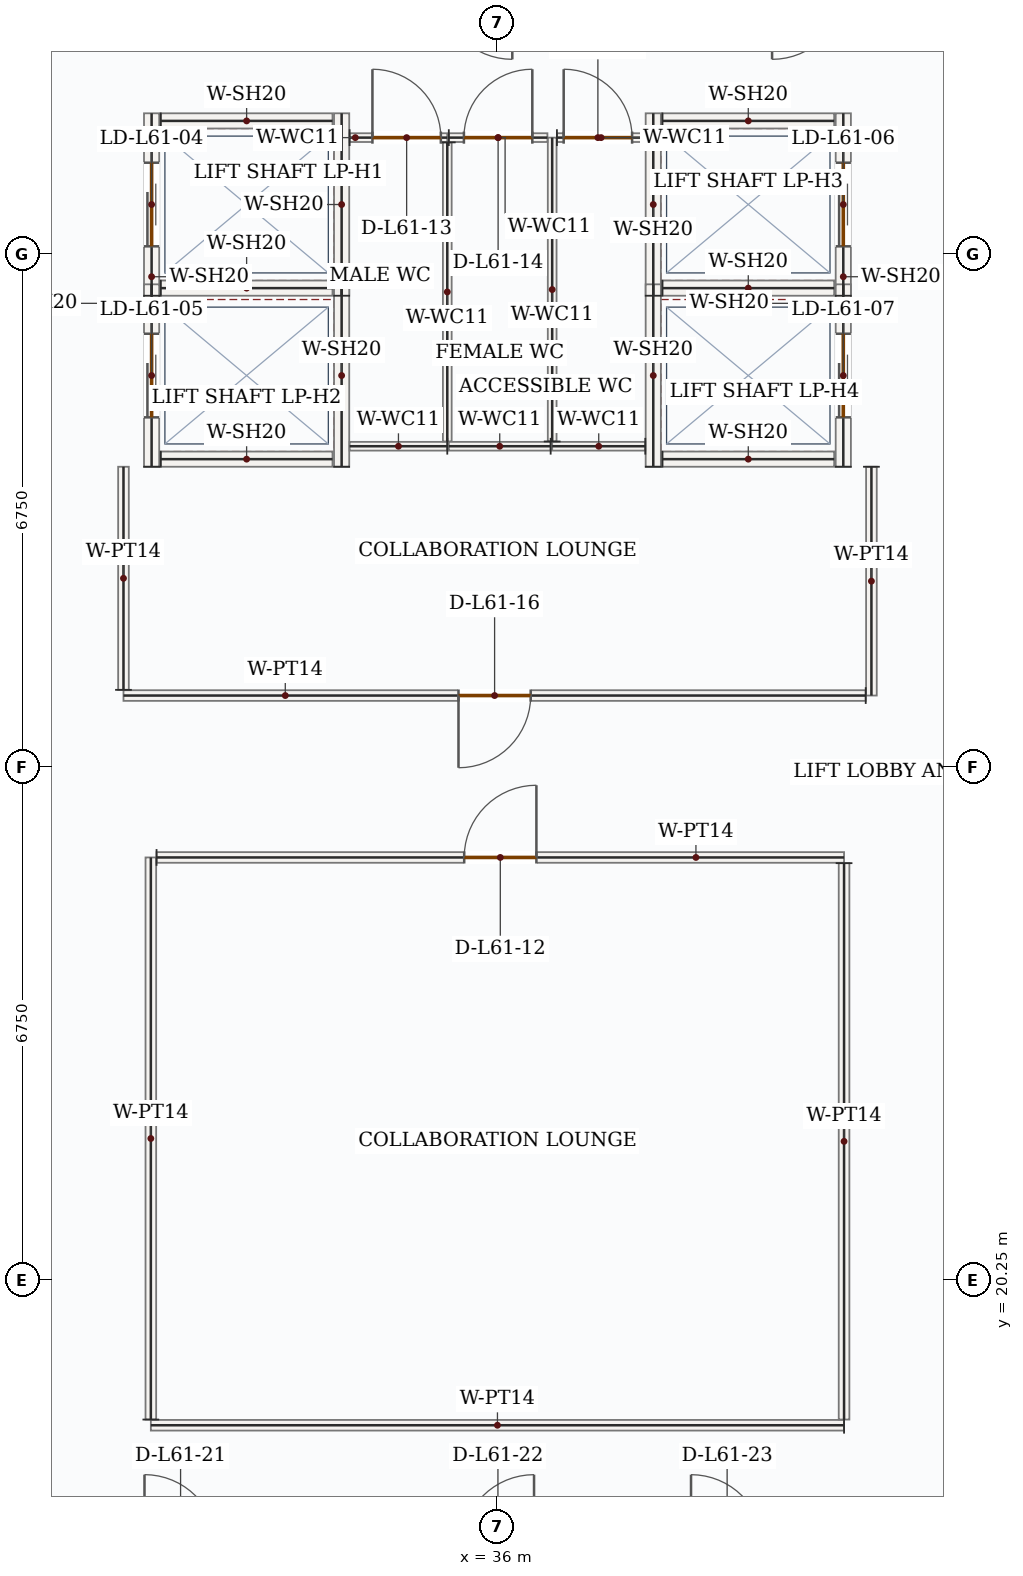
"""IFC4 building model, lengths in metres.
Left out: names, types, materials, properties, quantities, classifications, styles, units other than length and angle.
Written with IfcOpenShell. Run it as: python <this file> out.ifc"""

import sys

from ifc_helpers import new_model, si_unit, direction, frame, frame_2d, origin, place, context, subcontext, project, spatial, rectangle, extrude, source, transform, mapped, element, fill, save


model = new_model("IFC4")
c1 = context("Model", 3, precision=1e-05, world=origin(), true_north=direction((0.0, 1.0)))
c2 = subcontext(c1, "Body", "Model", "MODEL_VIEW")
j1 = project(units=[si_unit("LENGTHUNIT", "METRE"), si_unit("PLANEANGLEUNIT", "RADIAN")], contexts=[c1])
p1 = place(None, origin())
s1 = spatial("IfcSite", under=j1, at=p1, CompositionType="ELEMENT")
p2 = place(p1, origin())
s2 = spatial("IfcBuilding", under=s1, at=p2, CompositionType="ELEMENT")
p3 = place(p2, frame((0.0, 0.0, 257.85)))
s3 = spatial("IfcBuildingStorey", under=s2, at=p3, CompositionType="ELEMENT", Elevation=257.85)
p4 = place(p3, frame((31.45, 33.2, 0.0), z_axis=(0.0, 0.0, 1.0), x_axis=(0.0, 1.0, 0.0)))
e1 = element("IfcWall", 1, at=p4, inside=s3, PredefinedType="SOLIDWALL", context=c2, shape_type="SweptSolid", body=[
    extrude(rectangle(XDim=2.4, YDim=0.2, at=frame_2d((1.2, 0.0))), origin(), (0.0, 0.0, 1.0), 3.5),
])
p5 = place(p4, frame((0.65, 0.0, 0.0)))
e2 = element("IfcOpeningElement", 2, at=p5, cuts=e1, PredefinedType="OPENING", context=c2, shape_type="SweptSolid", body=[
    extrude(rectangle(XDim=1.1, YDim=2.15, at=frame_2d((0.55, 1.075))), frame((0.0, 0.11, 0.0), z_axis=(0.0, -1.0, 0.0), x_axis=(1.0, 0.0, 0.0)), (0.0, 0.0, 1.0), 0.22),
])
m1 = source(origin(), c2, "Body", "SweptSolid", [
    extrude(rectangle(XDim=2.4, YDim=0.2, at=frame_2d((1.2, 0.0))), origin(), (0.0, 0.0, 1.0), 3.5),
])
p6 = place(p3, frame((33.95, 33.2, 0.0), z_axis=(0.0, 0.0, 1.0), x_axis=(0.0, 1.0, 0.0)))
e3 = element("IfcWall", 3, at=p6, inside=s3, PredefinedType="SOLIDWALL", context=c2, shape_type="MappedRepresentation", body=[
    mapped(m1, transform((0.0, 0.0, 0.0), x_axis=(1.0, 0.0, 0.0), y_axis=(0.0, 1.0, 0.0), z_axis=(0.0, 0.0, 1.0), scale=1.0)),
])
m2 = source(origin(), c2, "Body", "SweptSolid", [
    extrude(rectangle(XDim=2.26, YDim=0.2, at=frame_2d((1.13, 0.0))), origin(), (0.0, 0.0, 1.0), 3.5),
])
for number, where, z_axis, x_axis in (
    (4, (31.57, 33.3, 0.0), (0.0, 0.0, 1.0), (1.0, 0.0, 0.0)),
    (5, (31.57, 35.5, 0.0), (0.0, 0.0, 1.0), (1.0, 0.0, 0.0)),
):
    element("IfcWall", number, at=place(p3, frame(where, z_axis=z_axis, x_axis=x_axis)), inside=s3, PredefinedType="SOLIDWALL", context=c2, shape_type="MappedRepresentation", body=[
        mapped(m2, transform((0.0, 0.0, 0.0), x_axis=(1.0, 0.0, 0.0), y_axis=(0.0, 1.0, 0.0), z_axis=(0.0, 0.0, 1.0), scale=1.0)),
    ])
p7 = place(p3, frame((31.45, 30.95, 0.0), z_axis=(0.0, 0.0, 1.0), x_axis=(0.0, 1.0, 0.0)))
e6 = element("IfcWall", 6, at=p7, inside=s3, PredefinedType="SOLIDWALL", context=c2, shape_type="SweptSolid", body=[
    extrude(rectangle(XDim=2.4, YDim=0.2, at=frame_2d((1.2, 0.0))), origin(), (0.0, 0.0, 1.0), 3.5),
])
p8 = place(p7, frame((0.65, 0.0, 0.0)))
e7 = element("IfcOpeningElement", 7, at=p8, cuts=e6, PredefinedType="OPENING", context=c2, shape_type="SweptSolid", body=[
    extrude(rectangle(XDim=1.1, YDim=2.15, at=frame_2d((0.55, 1.075))), frame((0.0, 0.11, 0.0), z_axis=(0.0, -1.0, 0.0), x_axis=(1.0, 0.0, 0.0)), (0.0, 0.0, 1.0), 0.22),
])
p9 = place(p3, frame((33.95, 30.95, 0.0), z_axis=(0.0, 0.0, 1.0), x_axis=(0.0, 1.0, 0.0)))
e8 = element("IfcWall", 8, at=p9, inside=s3, PredefinedType="SOLIDWALL", context=c2, shape_type="MappedRepresentation", body=[
    mapped(m1, transform((0.0, 0.0, 0.0), x_axis=(1.0, 0.0, 0.0), y_axis=(0.0, 1.0, 0.0), z_axis=(0.0, 0.0, 1.0), scale=1.0)),
])
p10 = place(p3, frame((31.57, 31.05, 0.0), z_axis=(0.0, 0.0, 1.0), x_axis=(1.0, 0.0, 0.0)))
e9 = element("IfcWall", 9, at=p10, inside=s3, PredefinedType="SOLIDWALL", context=c2, shape_type="MappedRepresentation", body=[
    mapped(m2, transform((0.0, 0.0, 0.0), x_axis=(1.0, 0.0, 0.0), y_axis=(0.0, 1.0, 0.0), z_axis=(0.0, 0.0, 1.0), scale=1.0)),
])
p11 = place(p3, frame((38.05, 33.2, 0.0), z_axis=(0.0, 0.0, 1.0), x_axis=(0.0, 1.0, 0.0)))
e10 = element("IfcWall", 10, at=p11, inside=s3, PredefinedType="SOLIDWALL", context=c2, shape_type="MappedRepresentation", body=[
    mapped(m1, transform((0.0, 0.0, 0.0), x_axis=(1.0, 0.0, 0.0), y_axis=(0.0, 1.0, 0.0), z_axis=(0.0, 0.0, 1.0), scale=1.0)),
])
p12 = place(p3, frame((40.55, 33.2, 0.0), z_axis=(0.0, 0.0, 1.0), x_axis=(0.0, 1.0, 0.0)))
e11 = element("IfcWall", 11, at=p12, inside=s3, PredefinedType="SOLIDWALL", context=c2, shape_type="SweptSolid", body=[
    extrude(rectangle(XDim=2.4, YDim=0.2, at=frame_2d((1.2, 0.0))), origin(), (0.0, 0.0, 1.0), 3.5),
])
p13 = place(p12, frame((0.65, 0.0, 0.0)))
e12 = element("IfcOpeningElement", 12, at=p13, cuts=e11, PredefinedType="OPENING", context=c2, shape_type="SweptSolid", body=[
    extrude(rectangle(XDim=1.1, YDim=2.15, at=frame_2d((0.55, 1.075))), frame((0.0, 0.11, 0.0), z_axis=(0.0, -1.0, 0.0), x_axis=(1.0, 0.0, 0.0)), (0.0, 0.0, 1.0), 0.22),
])
for number, where, z_axis, x_axis in (
    (13, (38.17, 33.3, 0.0), (0.0, 0.0, 1.0), (1.0, 0.0, 0.0)),
    (14, (38.17, 35.5, 0.0), (0.0, 0.0, 1.0), (1.0, 0.0, 0.0)),
):
    element("IfcWall", number, at=place(p3, frame(where, z_axis=z_axis, x_axis=x_axis)), inside=s3, PredefinedType="SOLIDWALL", context=c2, shape_type="MappedRepresentation", body=[
        mapped(m2, transform((0.0, 0.0, 0.0), x_axis=(1.0, 0.0, 0.0), y_axis=(0.0, 1.0, 0.0), z_axis=(0.0, 0.0, 1.0), scale=1.0)),
    ])
p14 = place(p3, frame((38.05, 30.95, 0.0), z_axis=(0.0, 0.0, 1.0), x_axis=(0.0, 1.0, 0.0)))
e15 = element("IfcWall", 15, at=p14, inside=s3, PredefinedType="SOLIDWALL", context=c2, shape_type="MappedRepresentation", body=[
    mapped(m1, transform((0.0, 0.0, 0.0), x_axis=(1.0, 0.0, 0.0), y_axis=(0.0, 1.0, 0.0), z_axis=(0.0, 0.0, 1.0), scale=1.0)),
])
p15 = place(p3, frame((40.55, 30.95, 0.0), z_axis=(0.0, 0.0, 1.0), x_axis=(0.0, 1.0, 0.0)))
e16 = element("IfcWall", 16, at=p15, inside=s3, PredefinedType="SOLIDWALL", context=c2, shape_type="SweptSolid", body=[
    extrude(rectangle(XDim=2.4, YDim=0.2, at=frame_2d((1.2, 0.0))), origin(), (0.0, 0.0, 1.0), 3.5),
])
p16 = place(p15, frame((0.65, 0.0, 0.0)))
e17 = element("IfcOpeningElement", 17, at=p16, cuts=e16, PredefinedType="OPENING", context=c2, shape_type="SweptSolid", body=[
    extrude(rectangle(XDim=1.1, YDim=2.15, at=frame_2d((0.55, 1.075))), frame((0.0, 0.11, 0.0), z_axis=(0.0, -1.0, 0.0), x_axis=(1.0, 0.0, 0.0)), (0.0, 0.0, 1.0), 0.22),
])
p17 = place(p3, frame((38.17, 31.05, 0.0), z_axis=(0.0, 0.0, 1.0), x_axis=(1.0, 0.0, 0.0)))
e18 = element("IfcWall", 18, at=p17, inside=s3, PredefinedType="SOLIDWALL", context=c2, shape_type="MappedRepresentation", body=[
    mapped(m2, transform((0.0, 0.0, 0.0), x_axis=(1.0, 0.0, 0.0), y_axis=(0.0, 1.0, 0.0), z_axis=(0.0, 0.0, 1.0), scale=1.0)),
])
m3 = source(origin(), c2, "Body", "SweptSolid", [
    extrude(rectangle(XDim=1.225, YDim=0.115, at=frame_2d((0.613, 0.0))), origin(), (0.0, 0.0, 1.0), 3.5),
])
p18 = place(p3, frame((37.945, 31.22, 0.0), z_axis=(0.0, 0.0, 1.0), x_axis=(-1.0, 0.0, 0.0)))
e19 = element("IfcWall", 19, at=p18, inside=s3, PredefinedType="PARTITIONING", context=c2, shape_type="MappedRepresentation", body=[
    mapped(m3, transform((0.0, 0.0, 0.0), x_axis=(1.0, 0.0, 0.0), y_axis=(0.0, 1.0, 0.0), z_axis=(0.0, 0.0, 1.0), scale=1.0)),
])
m4 = source(origin(), c2, "Body", "SweptSolid", [
    extrude(rectangle(XDim=3.998, YDim=0.115, at=frame_2d((1.999, 0.0))), origin(), (0.0, 0.0, 1.0), 3.5),
])
p19 = place(p3, frame((36.72, 31.282, 0.0), z_axis=(0.0, 0.0, 1.0), x_axis=(0.0, 1.0, 0.0)))
e20 = element("IfcWall", 20, at=p19, inside=s3, PredefinedType="PARTITIONING", context=c2, shape_type="MappedRepresentation", body=[
    mapped(m4, transform((0.0, 0.0, 0.0), x_axis=(1.0, 0.0, 0.0), y_axis=(0.0, 1.0, 0.0), z_axis=(0.0, 0.0, 1.0), scale=1.0)),
])
p20 = place(p3, frame((36.782, 35.28, 0.0), z_axis=(0.0, 0.0, 1.0), x_axis=(1.0, 0.0, 0.0)))
e21 = element("IfcWall", 21, at=p20, inside=s3, PredefinedType="PARTITIONING", context=c2, shape_type="SweptSolid", body=[
    extrude(rectangle(XDim=1.163, YDim=0.115, at=frame_2d((0.581, 0.0))), origin(), (0.0, 0.0, 1.0), 3.5),
])
p21 = place(p20, frame((0.089, 0.0, 0.0)))
e22 = element("IfcOpeningElement", 22, at=p21, cuts=e21, PredefinedType="OPENING", context=c2, shape_type="SweptSolid", body=[
    extrude(rectangle(XDim=0.9, YDim=2.1, at=frame_2d((0.45, 1.05))), frame((0.0, 0.067, 0.0), z_axis=(0.0, -1.0, 0.0), x_axis=(1.0, 0.0, 0.0)), (0.0, 0.0, 1.0), 0.135),
])
m5 = source(origin(), c2, "Body", "SweptSolid", [
    extrude(rectangle(XDim=1.285, YDim=0.115, at=frame_2d((0.643, 0.0))), origin(), (0.0, 0.0, 1.0), 3.5),
])
p22 = place(p3, frame((35.34, 31.22, 0.0), z_axis=(0.0, 0.0, 1.0), x_axis=(-1.0, 0.0, 0.0)))
e23 = element("IfcWall", 23, at=p22, inside=s3, PredefinedType="PARTITIONING", context=c2, shape_type="MappedRepresentation", body=[
    mapped(m5, transform((0.0, 0.0, 0.0), x_axis=(1.0, 0.0, 0.0), y_axis=(0.0, 1.0, 0.0), z_axis=(0.0, 0.0, 1.0), scale=1.0)),
])
p23 = place(p3, frame((34.055, 35.28, 0.0), z_axis=(0.0, 0.0, 1.0), x_axis=(1.0, 0.0, 0.0)))
e24 = element("IfcWall", 24, at=p23, inside=s3, PredefinedType="PARTITIONING", context=c2, shape_type="SweptSolid", body=[
    extrude(rectangle(XDim=1.285, YDim=0.115, at=frame_2d((0.643, 0.0))), origin(), (0.0, 0.0, 1.0), 3.5),
])
p24 = place(p23, frame((0.3, 0.0, 0.0)))
e25 = element("IfcOpeningElement", 25, at=p24, cuts=e24, PredefinedType="OPENING", context=c2, shape_type="SweptSolid", body=[
    extrude(rectangle(XDim=0.9, YDim=2.1, at=frame_2d((0.45, 1.05))), frame((0.0, 0.067, 0.0), z_axis=(0.0, -1.0, 0.0), x_axis=(1.0, 0.0, 0.0)), (0.0, 0.0, 1.0), 0.135),
])
m6 = source(origin(), c2, "Body", "SweptSolid", [
    extrude(rectangle(XDim=3.935, YDim=0.115, at=frame_2d((1.968, 0.0))), origin(), (0.0, 0.0, 1.0), 3.5),
])
p25 = place(p3, frame((35.34, 35.218, 0.0), z_axis=(0.0, 0.0, 1.0), x_axis=(0.0, -1.0, 0.0)))
e26 = element("IfcWall", 26, at=p25, inside=s3, PredefinedType="PARTITIONING", context=c2, shape_type="MappedRepresentation", body=[
    mapped(m6, transform((0.0, 0.0, 0.0), x_axis=(1.0, 0.0, 0.0), y_axis=(0.0, 1.0, 0.0), z_axis=(0.0, 0.0, 1.0), scale=1.0)),
])
m7 = source(origin(), c2, "Body", "SweptSolid", [
    extrude(rectangle(XDim=1.34, YDim=0.115, at=frame_2d((0.67, 0.0))), origin(), (0.0, 0.0, 1.0), 3.5),
])
p26 = place(p3, frame((36.7, 31.22, 0.0), z_axis=(0.0, 0.0, 1.0), x_axis=(-1.0, 0.0, 0.0)))
e27 = element("IfcWall", 27, at=p26, inside=s3, PredefinedType="PARTITIONING", context=c2, shape_type="MappedRepresentation", body=[
    mapped(m7, transform((0.0, 0.0, 0.0), x_axis=(1.0, 0.0, 0.0), y_axis=(0.0, 1.0, 0.0), z_axis=(0.0, 0.0, 1.0), scale=1.0)),
])
p27 = place(p3, frame((35.36, 35.28, 0.0), z_axis=(0.0, 0.0, 1.0), x_axis=(1.0, 0.0, 0.0)))
e28 = element("IfcWall", 28, at=p27, inside=s3, PredefinedType="PARTITIONING", context=c2, shape_type="SweptSolid", body=[
    extrude(rectangle(XDim=1.297, YDim=0.115, at=frame_2d((0.649, 0.0))), origin(), (0.0, 0.0, 1.0), 3.5),
])
p28 = place(p27, frame((0.199, 0.0, 0.0)))
e29 = element("IfcOpeningElement", 29, at=p28, cuts=e28, PredefinedType="OPENING", context=c2, shape_type="SweptSolid", body=[
    extrude(rectangle(XDim=0.9, YDim=2.1, at=frame_2d((0.45, 1.05))), frame((0.0, 0.067, 0.0), z_axis=(0.0, -1.0, 0.0), x_axis=(1.0, 0.0, 0.0)), (0.0, 0.0, 1.0), 0.135),
])
m8 = source(origin(), c2, "Body", "SweptSolid", [
    extrude(rectangle(XDim=3.01, YDim=0.14, at=frame_2d((1.505, 0.0))), origin(), (0.0, 0.0, 1.0), 3.5),
])
p29 = place(p3, frame((40.92, 30.95, 0.0), z_axis=(0.0, 0.0, 1.0), x_axis=(0.0, -1.0, 0.0)))
e30 = element("IfcWall", 30, at=p29, inside=s3, PredefinedType="PARTITIONING", context=c2, shape_type="MappedRepresentation", body=[
    mapped(m8, transform((0.0, 0.0, 0.0), x_axis=(1.0, 0.0, 0.0), y_axis=(0.0, 1.0, 0.0), z_axis=(0.0, 0.0, 1.0), scale=1.0)),
])
p30 = place(p3, frame((40.845, 27.94, 0.0), z_axis=(0.0, 0.0, 1.0), x_axis=(-1.0, 0.0, 0.0)))
e31 = element("IfcWall", 31, at=p30, inside=s3, PredefinedType="PARTITIONING", context=c2, shape_type="SweptSolid", body=[
    extrude(rectangle(XDim=9.765, YDim=0.14, at=frame_2d((4.882, 0.0))), origin(), (0.0, 0.0, 1.0), 3.5),
])
p31 = place(p30, frame((4.407, 0.0, 0.0)))
e32 = element("IfcOpeningElement", 32, at=p31, cuts=e31, PredefinedType="OPENING", context=c2, shape_type="SweptSolid", body=[
    extrude(rectangle(XDim=0.95, YDim=2.15, at=frame_2d((0.475, 1.075))), frame((0.0, 0.08, 0.0), z_axis=(0.0, -1.0, 0.0), x_axis=(1.0, 0.0, 0.0)), (0.0, 0.0, 1.0), 0.16),
])
m9 = source(origin(), c2, "Body", "SweptSolid", [
    extrude(rectangle(XDim=2.935, YDim=0.14, at=frame_2d((1.468, 0.0))), origin(), (0.0, 0.0, 1.0), 3.5),
])
p32 = place(p3, frame((31.08, 28.015, 0.0), z_axis=(0.0, 0.0, 1.0), x_axis=(0.0, 1.0, 0.0)))
e33 = element("IfcWall", 33, at=p32, inside=s3, PredefinedType="PARTITIONING", context=c2, shape_type="MappedRepresentation", body=[
    mapped(m9, transform((0.0, 0.0, 0.0), x_axis=(1.0, 0.0, 0.0), y_axis=(0.0, 1.0, 0.0), z_axis=(0.0, 0.0, 1.0), scale=1.0)),
])
m10 = source(origin(), c2, "Body", "SweptSolid", [
    extrude(rectangle(XDim=9.12, YDim=0.14, at=frame_2d((4.56, 0.0))), origin(), (0.0, 0.0, 1.0), 3.5),
])
p33 = place(p3, frame((40.56, 18.34, 0.0), z_axis=(0.0, 0.0, 1.0), x_axis=(-1.0, 0.0, 0.0)))
e34 = element("IfcWall", 34, at=p33, inside=s3, PredefinedType="PARTITIONING", context=c2, shape_type="MappedRepresentation", body=[
    mapped(m10, transform((0.0, 0.0, 0.0), x_axis=(1.0, 0.0, 0.0), y_axis=(0.0, 1.0, 0.0), z_axis=(0.0, 0.0, 1.0), scale=1.0)),
])
m11 = source(origin(), c2, "Body", "SweptSolid", [
    extrude(rectangle(XDim=7.395, YDim=0.14, at=frame_2d((3.698, 0.0))), origin(), (0.0, 0.0, 1.0), 3.5),
])
p34 = place(p3, frame((31.44, 18.415, 0.0), z_axis=(0.0, 0.0, 1.0), x_axis=(0.0, 1.0, 0.0)))
e35 = element("IfcWall", 35, at=p34, inside=s3, PredefinedType="PARTITIONING", context=c2, shape_type="MappedRepresentation", body=[
    mapped(m11, transform((0.0, 0.0, 0.0), x_axis=(1.0, 0.0, 0.0), y_axis=(0.0, 1.0, 0.0), z_axis=(0.0, 0.0, 1.0), scale=1.0)),
])
p35 = place(p3, frame((31.515, 25.81, 0.0), z_axis=(0.0, 0.0, 1.0), x_axis=(1.0, 0.0, 0.0)))
e36 = element("IfcWall", 36, at=p35, inside=s3, PredefinedType="PARTITIONING", context=c2, shape_type="SweptSolid", body=[
    extrude(rectangle(XDim=9.045, YDim=0.14, at=frame_2d((4.522, 0.0))), origin(), (0.0, 0.0, 1.0), 3.5),
])
p36 = place(p35, frame((4.048, 0.0, 0.0)))
e37 = element("IfcOpeningElement", 37, at=p36, cuts=e36, PredefinedType="OPENING", context=c2, shape_type="SweptSolid", body=[
    extrude(rectangle(XDim=0.95, YDim=2.15, at=frame_2d((0.475, 1.075))), frame((0.0, 0.08, 0.0), z_axis=(0.0, -1.0, 0.0), x_axis=(1.0, 0.0, 0.0)), (0.0, 0.0, 1.0), 0.16),
])
m12 = source(origin(), c2, "Body", "SweptSolid", [
    extrude(rectangle(XDim=7.32, YDim=0.14, at=frame_2d((3.66, 0.0))), origin(), (0.0, 0.0, 1.0), 3.5),
])
p37 = place(p3, frame((40.56, 25.735, 0.0), z_axis=(0.0, 0.0, 1.0), x_axis=(0.0, -1.0, 0.0)))
e38 = element("IfcWall", 38, at=p37, inside=s3, PredefinedType="PARTITIONING", context=c2, shape_type="MappedRepresentation", body=[
    mapped(m12, transform((0.0, 0.0, 0.0), x_axis=(1.0, 0.0, 0.0), y_axis=(0.0, 1.0, 0.0), z_axis=(0.0, 0.0, 1.0), scale=1.0)),
])
m13 = source(origin(), c2, "Body", "SweptSolid", [
    extrude(rectangle(XDim=1.1, YDim=2.15, at=frame_2d((0.55, 1.075))), frame((0.0, 0.025, 0.0), z_axis=(0.0, -1.0, 0.0), x_axis=(1.0, 0.0, 0.0)), (0.0, 0.0, 1.0), 0.05),
])
p38 = place(p5, origin())
e39 = element("IfcDoor", 39, at=p38, inside=s3, OperationType="DOUBLE_DOOR_SLIDING", PredefinedType="DOOR", context=c2, shape_type="MappedRepresentation", body=[
    mapped(m13, transform((0.0, 0.0, 0.0), x_axis=(1.0, 0.0, 0.0), y_axis=(0.0, 1.0, 0.0), z_axis=(0.0, 0.0, 1.0), scale=1.0)),
])
fill(e2, e39)
p39 = place(p8, origin())
e40 = element("IfcDoor", 40, at=p39, inside=s3, OperationType="DOUBLE_DOOR_SLIDING", PredefinedType="DOOR", context=c2, shape_type="MappedRepresentation", body=[
    mapped(m13, transform((0.0, 0.0, 0.0), x_axis=(1.0, 0.0, 0.0), y_axis=(0.0, 1.0, 0.0), z_axis=(0.0, 0.0, 1.0), scale=1.0)),
])
fill(e7, e40)
p40 = place(p13, origin())
e41 = element("IfcDoor", 41, at=p40, inside=s3, OperationType="DOUBLE_DOOR_SLIDING", PredefinedType="DOOR", context=c2, shape_type="MappedRepresentation", body=[
    mapped(m13, transform((0.0, 0.0, 0.0), x_axis=(1.0, 0.0, 0.0), y_axis=(0.0, 1.0, 0.0), z_axis=(0.0, 0.0, 1.0), scale=1.0)),
])
fill(e12, e41)
p41 = place(p16, origin())
e42 = element("IfcDoor", 42, at=p41, inside=s3, OperationType="DOUBLE_DOOR_SLIDING", PredefinedType="DOOR", context=c2, shape_type="MappedRepresentation", body=[
    mapped(m13, transform((0.0, 0.0, 0.0), x_axis=(1.0, 0.0, 0.0), y_axis=(0.0, 1.0, 0.0), z_axis=(0.0, 0.0, 1.0), scale=1.0)),
])
fill(e17, e42)
m14 = source(origin(), c2, "Body", "SweptSolid", [
    extrude(rectangle(XDim=0.95, YDim=2.15, at=frame_2d((0.475, 1.075))), frame((0.0, 0.025, 0.0), z_axis=(0.0, -1.0, 0.0), x_axis=(1.0, 0.0, 0.0)), (0.0, 0.0, 1.0), 0.05),
])
p42 = place(p36, origin())
e43 = element("IfcDoor", 43, at=p42, inside=s3, OperationType="SINGLE_SWING_RIGHT", PredefinedType="DOOR", context=c2, shape_type="MappedRepresentation", body=[
    mapped(m14, transform((0.0, 0.0, 0.0), x_axis=(1.0, 0.0, 0.0), y_axis=(0.0, 1.0, 0.0), z_axis=(0.0, 0.0, 1.0), scale=1.0)),
])
fill(e37, e43)
m15 = source(origin(), c2, "Body", "SweptSolid", [
    extrude(rectangle(XDim=0.9, YDim=2.1, at=frame_2d((0.45, 1.05))), frame((0.0, 0.025, 0.0), z_axis=(0.0, -1.0, 0.0), x_axis=(1.0, 0.0, 0.0)), (0.0, 0.0, 1.0), 0.05),
])
p43 = place(p24, origin())
e44 = element("IfcDoor", 44, at=p43, inside=s3, OperationType="SINGLE_SWING_LEFT", PredefinedType="DOOR", context=c2, shape_type="MappedRepresentation", body=[
    mapped(m15, transform((0.0, 0.0, 0.0), x_axis=(1.0, 0.0, 0.0), y_axis=(0.0, 1.0, 0.0), z_axis=(0.0, 0.0, 1.0), scale=1.0)),
])
fill(e25, e44)
p44 = place(p28, origin())
e45 = element("IfcDoor", 45, at=p44, inside=s3, OperationType="SINGLE_SWING_RIGHT", PredefinedType="DOOR", context=c2, shape_type="MappedRepresentation", body=[
    mapped(m15, transform((0.0, 0.0, 0.0), x_axis=(1.0, 0.0, 0.0), y_axis=(0.0, 1.0, 0.0), z_axis=(0.0, 0.0, 1.0), scale=1.0)),
])
fill(e29, e45)
p45 = place(p21, origin())
e46 = element("IfcDoor", 46, at=p45, inside=s3, OperationType="SINGLE_SWING_LEFT", PredefinedType="DOOR", context=c2, shape_type="MappedRepresentation", body=[
    mapped(m15, transform((0.0, 0.0, 0.0), x_axis=(1.0, 0.0, 0.0), y_axis=(0.0, 1.0, 0.0), z_axis=(0.0, 0.0, 1.0), scale=1.0)),
])
fill(e22, e46)
p46 = place(p31, origin())
e47 = element("IfcDoor", 47, at=p46, inside=s3, OperationType="SINGLE_SWING_RIGHT", PredefinedType="DOOR", context=c2, shape_type="MappedRepresentation", body=[
    mapped(m14, transform((0.0, 0.0, 0.0), x_axis=(1.0, 0.0, 0.0), y_axis=(0.0, 1.0, 0.0), z_axis=(0.0, 0.0, 1.0), scale=1.0)),
])
fill(e32, e47)
save(model, sys.argv[1])
